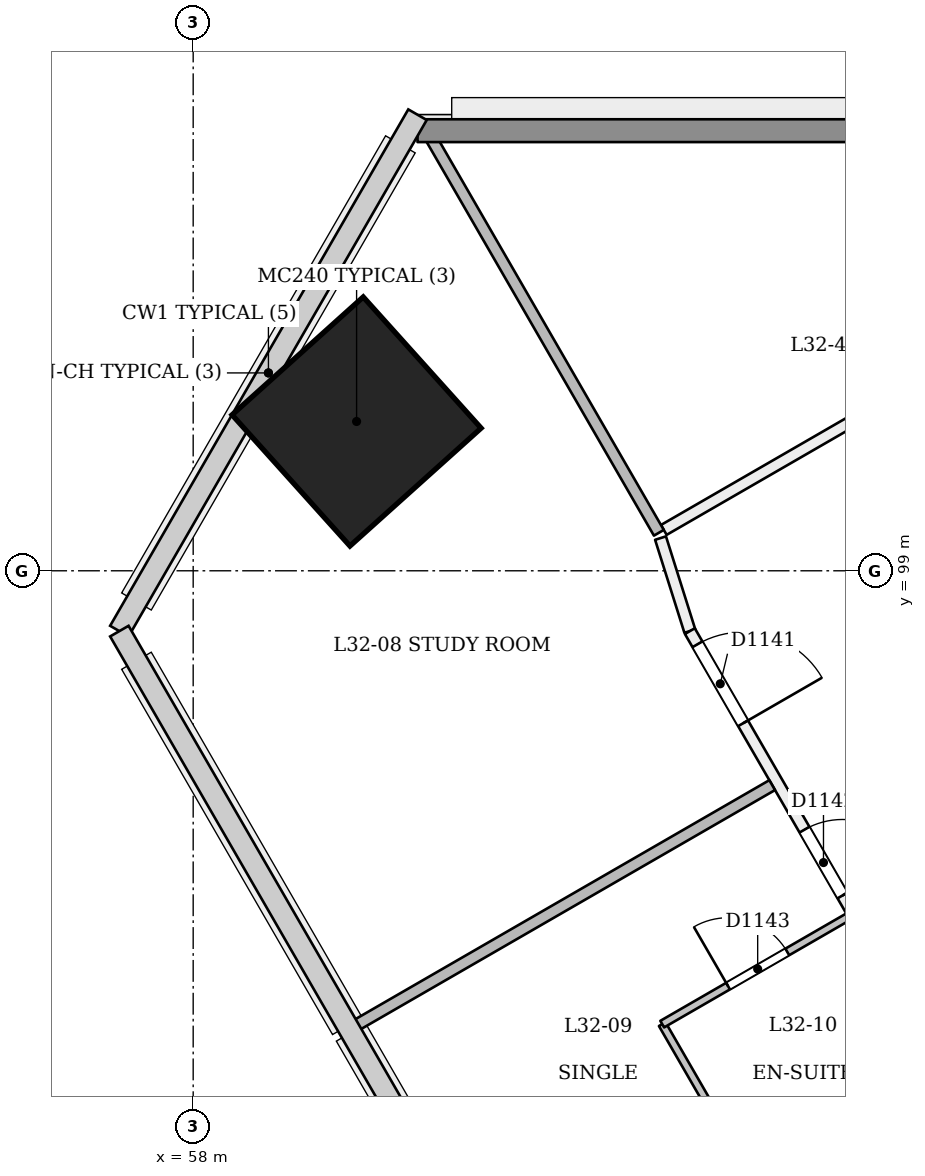
"""IFC4 building model, lengths in metres.
Left out: names, types, materials, properties, quantities, classifications, styles, units other than length and angle.
Written with IfcOpenShell. Run it as: python <this file> out.ifc"""

import sys

from ifc_helpers import new_model, si_unit, direction, frame, frame_2d, origin, origin_2d, place, context, subcontext, project, spatial, rectangle, extrude, element, fill, save


model = new_model("IFC4")
c1 = context("Model", 3, precision=1e-05, world=origin(), true_north=direction((0.0, 1.0)))
c2 = subcontext(c1, "Body", "Model", "MODEL_VIEW")
j1 = project(units=[si_unit("LENGTHUNIT", "METRE"), si_unit("PLANEANGLEUNIT", "RADIAN")], contexts=[c1])
p1 = place(None, origin())
s1 = spatial("IfcSite", under=j1, at=p1, CompositionType="ELEMENT")
p2 = place(p1, origin())
s2 = spatial("IfcBuilding", under=s1, at=p2, CompositionType="ELEMENT")
p3 = place(p2, frame((0.0, 0.0, 127.8)))
s3 = spatial("IfcBuildingStorey", under=s2, at=p3, CompositionType="ELEMENT", Elevation=127.8)
p4 = place(p3, frame((60.116, 100.953, 0.0), z_axis=(0.028403739082, 0.009219352065, 0.999554016126), x_axis=(-0.865118537923, 0.501170103086, 0.019961039903)))
e1 = element("IfcColumn", 1, at=p4, inside=s3, PredefinedType="COLUMN", context=c2, shape_type="SweptSolid", body=[
    extrude(rectangle(XDim=2.32, YDim=2.32, at=origin_2d()), origin(), (0.0, 0.0, 1.0), 3.602),
])
p5 = place(p3, frame((64.149, 99.43, 0.0), z_axis=(0.0, 0.0, 1.0), x_axis=(0.300548671062, -0.953766478926, 0.0)))
e2 = element("IfcWall", 2, at=p5, inside=s3, PredefinedType="PARTITIONING", context=c2, shape_type="SweptSolid", body=[
    extrude(rectangle(XDim=1.283, YDim=0.15, at=frame_2d((0.642, 0.0))), origin(), (0.0, 0.0, 1.0), 3.15),
])
p6 = place(p3, frame((64.534, 98.206, 0.0), z_axis=(0.0, 0.0, 1.0), x_axis=(0.499999603446, -0.866025632735, 0.0)))
e3 = element("IfcWall", 3, at=p6, inside=s3, PredefinedType="PARTITIONING", context=c2, shape_type="SweptSolid", body=[
    extrude(rectangle(XDim=40.592, YDim=0.15, at=frame_2d((20.296, 0.0))), origin(), (0.0, 0.0, 1.0), 2.75),
])
p7 = place(p6, frame((0.2, 0.0, 0.0)))
e4 = element("IfcOpeningElement", 4, at=p7, cuts=e3, PredefinedType="OPENING", context=c2, shape_type="SweptSolid", body=[
    extrude(rectangle(XDim=1.2, YDim=2.1, at=frame_2d((0.6, 1.05))), frame((0.0, 0.085, 0.0), z_axis=(0.0, -1.0, 0.0), x_axis=(1.0, 0.0, 0.0)), (0.0, 0.0, 1.0), 0.171),
])
p8 = place(p6, frame((3.016, 0.0, 0.0)))
e5 = element("IfcOpeningElement", 5, at=p8, cuts=e3, PredefinedType="OPENING", context=c2, shape_type="SweptSolid", body=[
    extrude(rectangle(XDim=1.0, YDim=2.1, at=frame_2d((0.5, 1.05))), frame((0.0, 0.085, 0.0), z_axis=(0.0, -1.0, 0.0), x_axis=(1.0, 0.0, 0.0)), (0.0, 0.0, 1.0), 0.171),
])
p9 = place(p6, frame((9.691, 0.0, 0.0)))
e6 = element("IfcOpeningElement", 6, at=p9, cuts=e3, PredefinedType="OPENING", context=c2, shape_type="SweptSolid", body=[
    extrude(rectangle(XDim=1.0, YDim=2.1, at=frame_2d((0.5, 1.05))), frame((0.0, 0.085, 0.0), z_axis=(0.0, -1.0, 0.0), x_axis=(1.0, 0.0, 0.0)), (0.0, 0.0, 1.0), 0.171),
])
p10 = place(p6, frame((11.901, 0.0, 0.0)))
e7 = element("IfcOpeningElement", 7, at=p10, cuts=e3, PredefinedType="OPENING", context=c2, shape_type="SweptSolid", body=[
    extrude(rectangle(XDim=1.0, YDim=2.1, at=frame_2d((0.5, 1.05))), frame((0.0, 0.085, 0.0), z_axis=(0.0, -1.0, 0.0), x_axis=(1.0, 0.0, 0.0)), (0.0, 0.0, 1.0), 0.171),
])
p11 = place(p6, frame((18.576, 0.0, 0.0)))
e8 = element("IfcOpeningElement", 8, at=p11, cuts=e3, PredefinedType="OPENING", context=c2, shape_type="SweptSolid", body=[
    extrude(rectangle(XDim=1.0, YDim=2.1, at=frame_2d((0.5, 1.05))), frame((0.0, 0.085, 0.0), z_axis=(0.0, -1.0, 0.0), x_axis=(1.0, 0.0, 0.0)), (0.0, 0.0, 1.0), 0.171),
])
p12 = place(p6, frame((22.046, 0.0, 0.0)))
e9 = element("IfcOpeningElement", 9, at=p12, cuts=e3, PredefinedType="OPENING", context=c2, shape_type="SweptSolid", body=[
    extrude(rectangle(XDim=1.0, YDim=2.1, at=frame_2d((0.5, 1.05))), frame((0.0, 0.085, 0.0), z_axis=(0.0, -1.0, 0.0), x_axis=(1.0, 0.0, 0.0)), (0.0, 0.0, 1.0), 0.171),
])
p13 = place(p6, frame((27.576, 0.0, 0.0)))
e10 = element("IfcOpeningElement", 10, at=p13, cuts=e3, PredefinedType="OPENING", context=c2, shape_type="SweptSolid", body=[
    extrude(rectangle(XDim=1.0, YDim=2.1, at=frame_2d((0.5, 1.05))), frame((0.0, 0.085, 0.0), z_axis=(0.0, -1.0, 0.0), x_axis=(1.0, 0.0, 0.0)), (0.0, 0.0, 1.0), 0.171),
])
p14 = place(p6, frame((31.046, 0.0, 0.0)))
e11 = element("IfcOpeningElement", 11, at=p14, cuts=e3, PredefinedType="OPENING", context=c2, shape_type="SweptSolid", body=[
    extrude(rectangle(XDim=1.0, YDim=2.1, at=frame_2d((0.5, 1.05))), frame((0.0, 0.085, 0.0), z_axis=(0.0, -1.0, 0.0), x_axis=(1.0, 0.0, 0.0)), (0.0, 0.0, 1.0), 0.171),
])
p15 = place(p6, frame((36.576, 0.0, 0.0)))
e12 = element("IfcOpeningElement", 12, at=p15, cuts=e3, PredefinedType="OPENING", context=c2, shape_type="SweptSolid", body=[
    extrude(rectangle(XDim=1.0, YDim=2.1, at=frame_2d((0.5, 1.05))), frame((0.0, 0.085, 0.0), z_axis=(0.0, -1.0, 0.0), x_axis=(1.0, 0.0, 0.0)), (0.0, 0.0, 1.0), 0.171),
])
p16 = place(p6, frame((39.323, 0.0, 0.0)))
e13 = element("IfcOpeningElement", 13, at=p16, cuts=e3, PredefinedType="OPENING", context=c2, shape_type="SweptSolid", body=[
    extrude(rectangle(XDim=1.0, YDim=2.1, at=frame_2d((0.5, 1.05))), frame((0.0, 0.085, 0.0), z_axis=(0.0, -1.0, 0.0), x_axis=(1.0, 0.0, 0.0)), (0.0, 0.0, 1.0), 0.171),
])
p17 = place(p3, frame((66.638, 100.95, 0.0), z_axis=(0.0, 0.0, 1.0), x_axis=(-0.866048868473, -0.499959355765, 0.0)))
e14 = element("IfcWall", 14, at=p17, inside=s3, PredefinedType="PARTITIONING", context=c2, shape_type="SweptSolid", body=[
    extrude(rectangle(XDim=2.825, YDim=0.15, at=frame_2d((1.413, 0.0))), origin(), (0.0, 0.0, 1.0), 3.15),
])
p18 = place(p3, frame((60.122, 93.008, 0.0), z_axis=(0.0, 0.0, 1.0), x_axis=(0.866025401434, 0.500000004071, 0.0)))
e15 = element("IfcWall", 15, at=p18, inside=s3, PredefinedType="PARTITIONING", context=c2, shape_type="SweptSolid", body=[
    extrude(rectangle(XDim=6.345, YDim=0.15, at=frame_2d((3.173, 0.0))), origin(), (0.0, 0.0, 1.0), 2.65),
])
p19 = place(p3, frame((64.127, 99.5, 0.0), z_axis=(0.0, 0.0, 1.0), x_axis=(-0.500004896655, 0.866022576681, 0.0)))
e16 = element("IfcWall", 16, at=p19, inside=s3, PredefinedType="PARTITIONING", context=c2, shape_type="SweptSolid", body=[
    extrude(rectangle(XDim=6.235, YDim=0.15, at=frame_2d((3.118, 0.0))), origin(), (0.0, 0.0, 1.0), 2.65),
])
p20 = place(p3, frame((65.271, 91.13, 0.0), z_axis=(0.0, 0.0, 1.0), x_axis=(-0.499946605688, 0.86605622881, 0.0)))
e17 = element("IfcWall", 17, at=p20, inside=s3, PredefinedType="PARTITIONING", context=c2, shape_type="SweptSolid", body=[
    extrude(rectangle(XDim=2.2, YDim=0.1, at=frame_2d((1.1, 0.0))), origin(), (0.0, 0.0, 1.0), 3.15),
])
p21 = place(p3, frame((64.171, 93.036, 0.0), z_axis=(0.0, 0.0, 1.0), x_axis=(0.866011447264, 0.500024172624, 0.0)))
e18 = element("IfcWall", 18, at=p21, inside=s3, PredefinedType="PARTITIONING", context=c2, shape_type="SweptSolid", body=[
    extrude(rectangle(XDim=2.825, YDim=0.1, at=frame_2d((1.413, 0.0))), origin(), (0.0, 0.0, 1.0), 3.15),
])
p22 = place(p21, frame((1.0, 0.0, 0.0)))
e19 = element("IfcOpeningElement", 19, at=p22, cuts=e18, PredefinedType="OPENING", context=c2, shape_type="SweptSolid", body=[
    extrude(rectangle(XDim=0.9, YDim=2.1, at=frame_2d((0.45, 1.05))), frame((0.0, 0.061, 0.0), z_axis=(0.0, -1.0, 0.0), x_axis=(1.0, 0.0, 0.0)), (0.0, 0.0, 1.0), 0.121),
])
p23 = place(p3, frame((65.404, 90.861, 0.0), z_axis=(0.0, 0.0, 1.0), x_axis=(0.866011243319, 0.500024525844, 0.0)))
e20 = element("IfcWall", 20, at=p23, inside=s3, PredefinedType="PARTITIONING", context=c2, shape_type="SweptSolid", body=[
    extrude(rectangle(XDim=2.845, YDim=0.1, at=frame_2d((1.422, 0.0))), origin(), (0.0, 0.0, 1.0), 2.75),
])
p24 = place(p3, frame((60.951, 104.79, 0.0), z_axis=(0.0, 0.0, 1.0), x_axis=(1.0, 0.0, 0.0)))
e21 = element("IfcWall", 21, at=p24, inside=s3, PredefinedType="SOLIDWALL", context=c2, shape_type="SweptSolid", body=[
    extrude(rectangle(XDim=48.098, YDim=0.3, at=frame_2d((24.049, 0.0))), origin(), (0.0, 0.0, 1.0), 2.65),
])
p25 = place(p7, origin())
e22 = element("IfcDoor", 22, at=p25, inside=s3, OperationType="SINGLE_SWING_RIGHT", PredefinedType="NOTDEFINED", context=c2, shape_type="SweptSolid", body=[
    extrude(rectangle(XDim=1.2, YDim=2.1, at=frame_2d((0.6, 1.05))), frame((0.0, 0.025, 0.0), z_axis=(0.0, -1.0, 0.0), x_axis=(1.0, 0.0, 0.0)), (0.0, 0.0, 1.0), 0.05),
])
fill(e4, e22)
p26 = place(p8, origin())
e23 = element("IfcDoor", 23, at=p26, inside=s3, OperationType="SINGLE_SWING_RIGHT", PredefinedType="NOTDEFINED", context=c2, shape_type="SweptSolid", body=[
    extrude(rectangle(XDim=1.0, YDim=2.1, at=frame_2d((0.5, 1.05))), frame((0.0, 0.025, 0.0), z_axis=(0.0, -1.0, 0.0), x_axis=(1.0, 0.0, 0.0)), (0.0, 0.0, 1.0), 0.05),
])
fill(e5, e23)
p27 = place(p22, origin())
e24 = element("IfcDoor", 24, at=p27, inside=s3, OperationType="SINGLE_SWING_LEFT", PredefinedType="NOTDEFINED", context=c2, shape_type="SweptSolid", body=[
    extrude(rectangle(XDim=0.9, YDim=2.1, at=frame_2d((0.45, 1.05))), frame((0.0, 0.025, 0.0), z_axis=(0.0, -1.0, 0.0), x_axis=(1.0, 0.0, 0.0)), (0.0, 0.0, 1.0), 0.05),
])
fill(e19, e24)
save(model, sys.argv[1])
